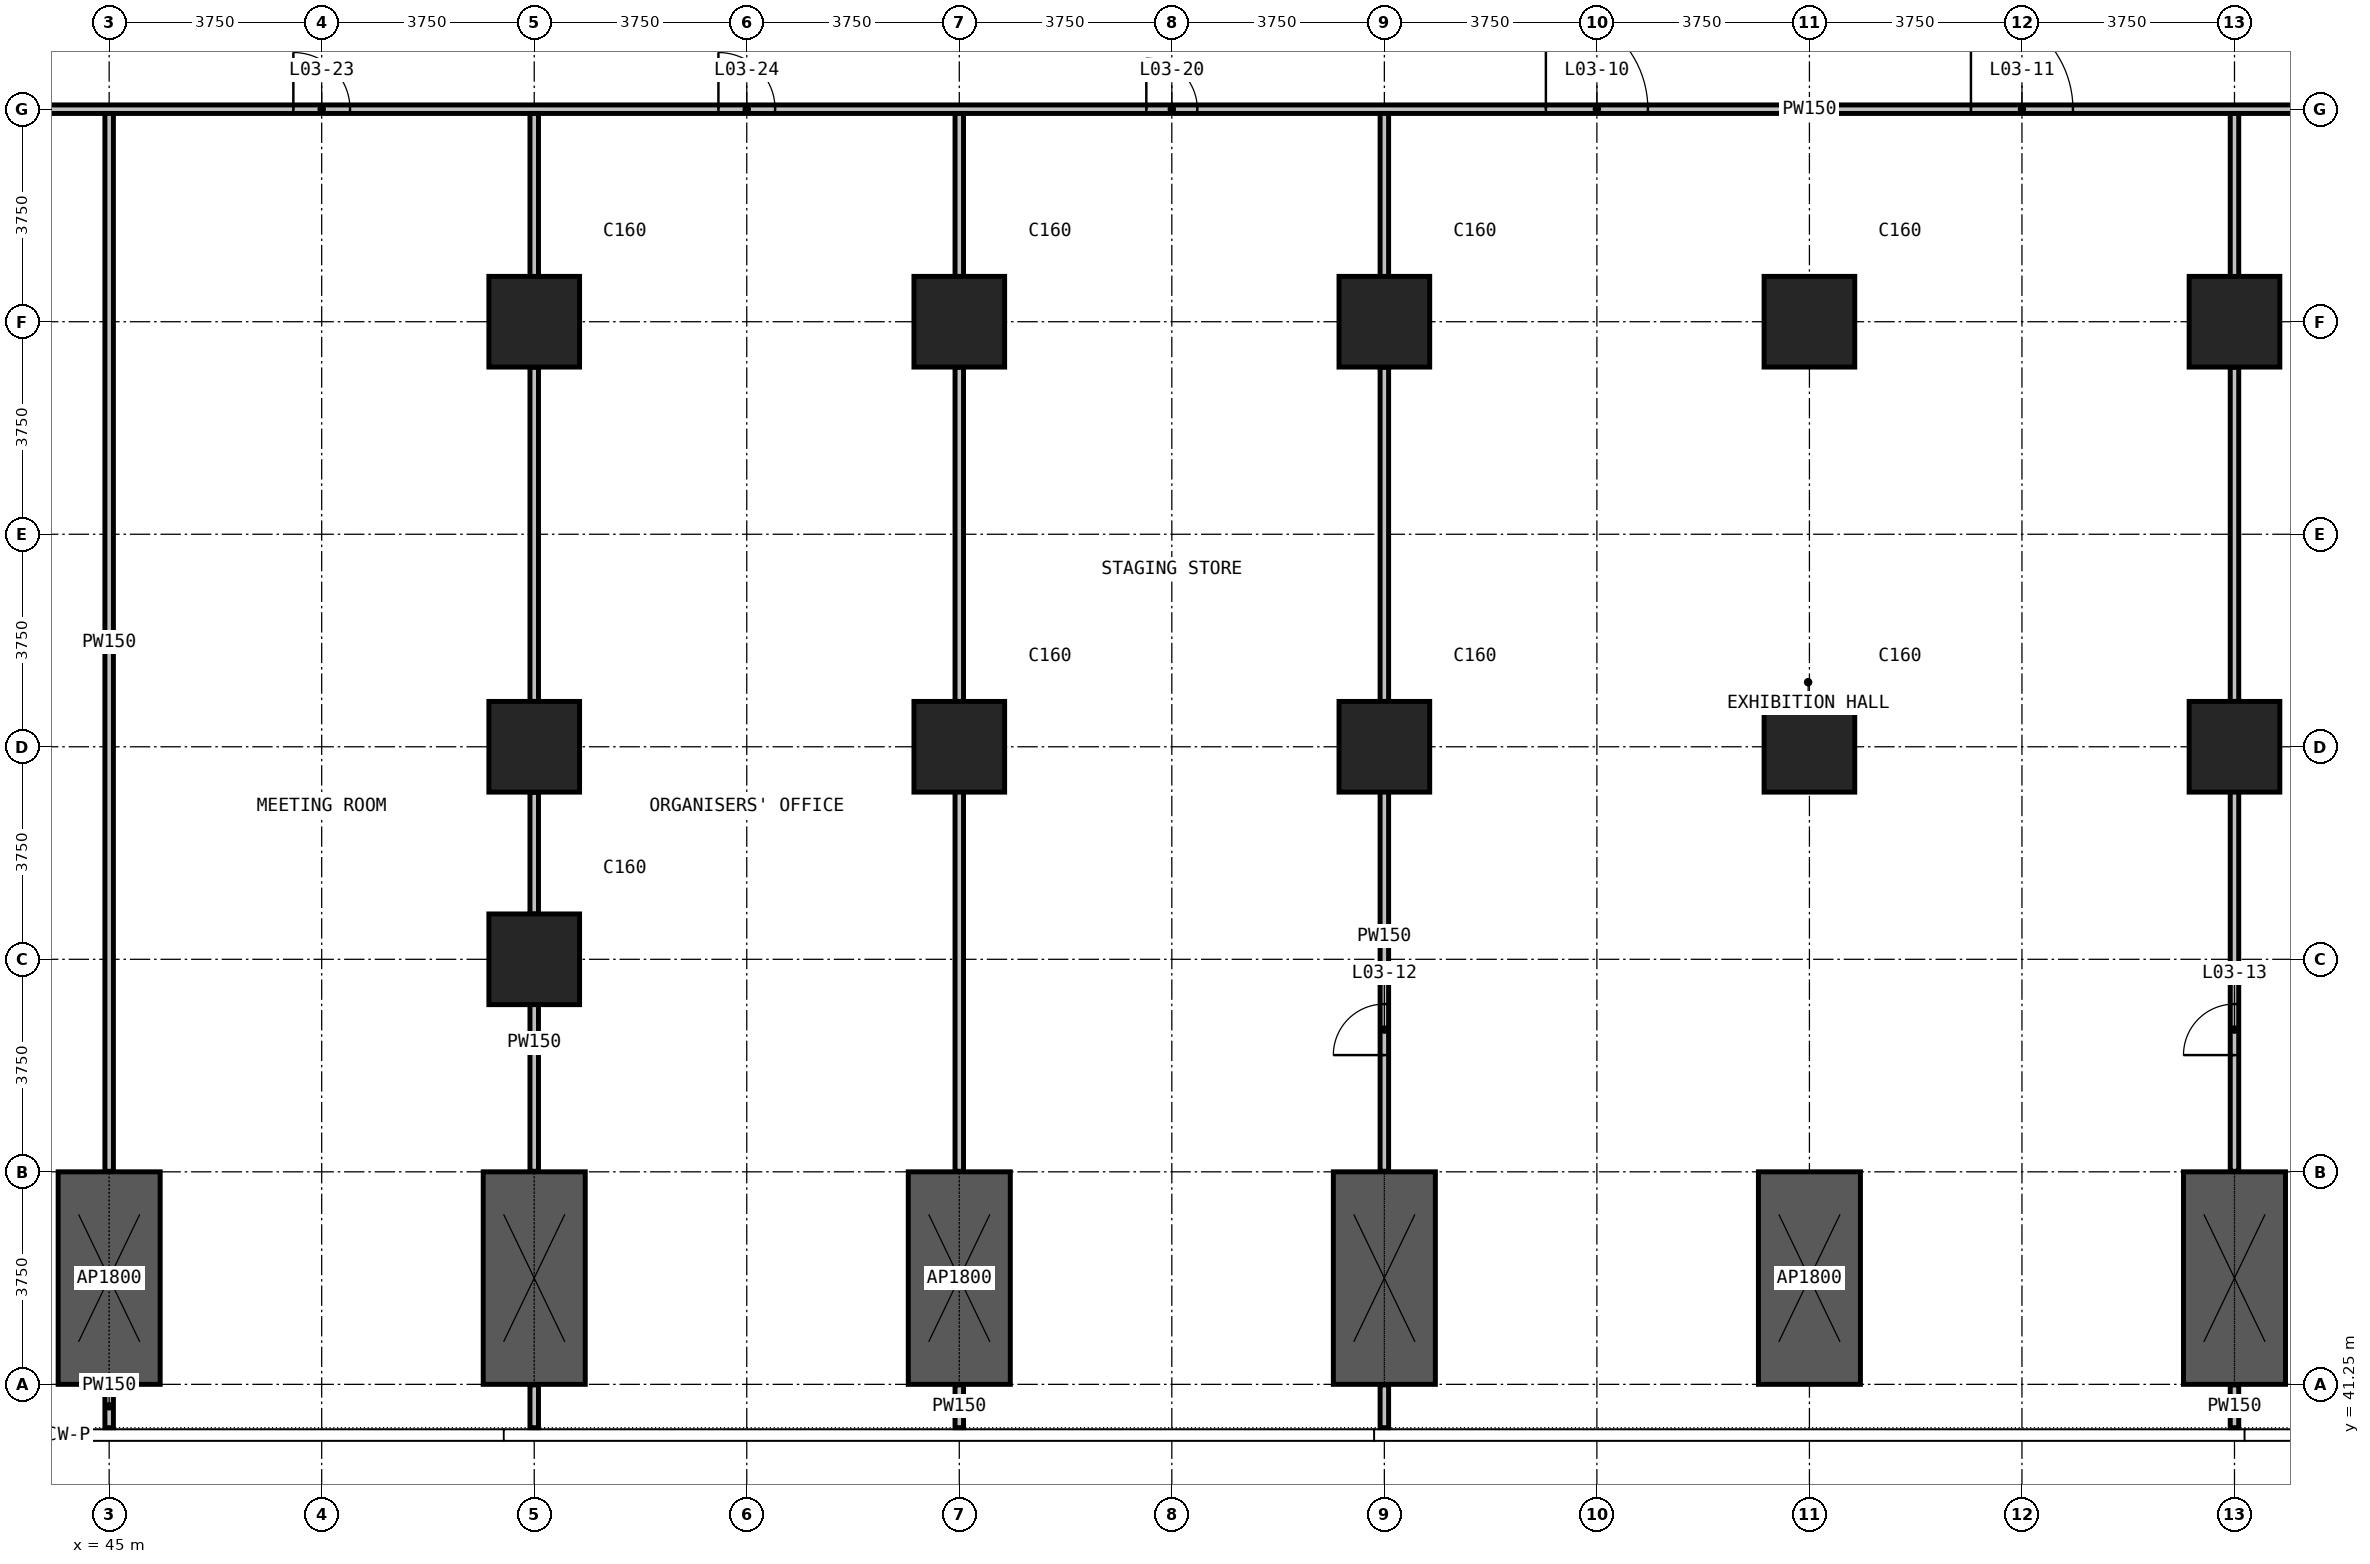
"""IFC4 building model, lengths in metres.
Left out: names, types, materials, properties, quantities, classifications, styles, units other than length and angle.
Written with IfcOpenShell. Run it as: python <this file> out.ifc"""

import sys

from ifc_helpers import new_model, si_unit, direction, frame, frame_2d, origin, origin_2d, place, context, subcontext, project, spatial, rectangle, extrude, element, fill, save


model = new_model("IFC4")
c1 = context("Model", 3, precision=1e-05, world=origin(), true_north=direction((0.0, 1.0)))
c2 = subcontext(c1, "Body", "Model", "MODEL_VIEW")
j1 = project(units=[si_unit("LENGTHUNIT", "METRE"), si_unit("PLANEANGLEUNIT", "RADIAN")], contexts=[c1])
p1 = place(None, origin())
s1 = spatial("IfcSite", under=j1, at=p1, CompositionType="ELEMENT")
p2 = place(p1, origin())
s2 = spatial("IfcBuilding", under=s1, at=p2, CompositionType="ELEMENT")
p3 = place(p2, frame((0.0, 0.0, 24.0)))
s3 = spatial("IfcBuildingStorey", under=s2, at=p3, CompositionType="ELEMENT", Elevation=24.0)
for number, where, z_axis, x_axis in (
    (1, (45.0, 41.25, 0.0), (0.0, 0.0, 1.0), (0.0, 1.0, 0.0)),
    (2, (52.5, 41.25, 0.0), (0.0, 0.0, 1.0), (0.0, 1.0, 0.0)),
    (3, (60.0, 41.25, 0.0), (0.0, 0.0, 1.0), (0.0, 1.0, 0.0)),
    (4, (67.5, 41.25, 0.0), (0.0, 0.0, 1.0), (0.0, 1.0, 0.0)),
    (5, (75.0, 41.25, 0.0), (0.0, 0.0, 1.0), (0.0, 1.0, 0.0)),
    (6, (82.5, 41.25, 0.0), (0.0, 0.0, 1.0), (0.0, 1.0, 0.0)),
):
    element("IfcWall", number, at=place(p3, frame(where, z_axis=z_axis, x_axis=x_axis)), inside=s3, PredefinedType="SHEAR", context=c2, shape_type="SweptSolid", body=[
        extrude(rectangle(XDim=3.75, YDim=1.8, at=frame_2d((1.875, 0.0))), origin(), (0.0, 0.0, 1.0), 6.0),
    ])
for number, where, z_axis, x_axis in (
    (7, (52.5, 48.75, 0.0), (0.0, 0.0, 1.0), (1.0, 0.0, 0.0)),
    (8, (52.5, 52.5, 0.0), (0.0, 0.0, 1.0), (1.0, 0.0, 0.0)),
    (9, (52.5, 60.0, 0.0), (0.0, 0.0, 1.0), (1.0, 0.0, 0.0)),
    (10, (60.0, 52.5, 0.0), (0.0, 0.0, 1.0), (1.0, 0.0, 0.0)),
    (11, (60.0, 60.0, 0.0), (0.0, 0.0, 1.0), (1.0, 0.0, 0.0)),
    (12, (67.5, 52.5, 0.0), (0.0, 0.0, 1.0), (1.0, 0.0, 0.0)),
    (13, (67.5, 60.0, 0.0), (0.0, 0.0, 1.0), (1.0, 0.0, 0.0)),
    (14, (75.0, 52.5, 0.0), (0.0, 0.0, 1.0), (1.0, 0.0, 0.0)),
    (15, (75.0, 60.0, 0.0), (0.0, 0.0, 1.0), (1.0, 0.0, 0.0)),
    (16, (82.5, 52.5, 0.0), (0.0, 0.0, 1.0), (1.0, 0.0, 0.0)),
    (17, (82.5, 60.0, 0.0), (0.0, 0.0, 1.0), (1.0, 0.0, 0.0)),
):
    element("IfcColumn", number, at=place(p3, frame(where, z_axis=z_axis, x_axis=x_axis)), inside=s3, PredefinedType="COLUMN", context=c2, shape_type="SweptSolid", body=[
        extrude(rectangle(XDim=1.6, YDim=1.6, at=origin_2d()), origin(), (0.0, 0.0, 1.0), 6.0),
    ])
p4 = place(p3, frame((36.735, 63.75, 0.0), z_axis=(0.0, 0.0, 1.0), x_axis=(1.0, 0.0, 0.0)))
e18 = element("IfcWall", 18, at=p4, inside=s3, PredefinedType="PARTITIONING", context=c2, shape_type="SweptSolid", body=[
    extrude(rectangle(XDim=76.53, YDim=0.15, at=frame_2d((38.265, 0.0))), origin(), (0.0, 0.0, 1.0), 5.65),
])
p5 = place(p4, frame((33.615, 0.0, 0.0)))
e19 = element("IfcOpeningElement", 19, at=p5, cuts=e18, PredefinedType="OPENING", context=c2, shape_type="SweptSolid", body=[
    extrude(rectangle(XDim=1.8, YDim=2.2, at=frame_2d((0.9, 1.1))), frame((0.0, 0.085, 0.0), z_axis=(0.0, -1.0, 0.0), x_axis=(1.0, 0.0, 0.0)), (0.0, 0.0, 1.0), 0.17),
])
p6 = place(p4, frame((41.115, 0.0, 0.0)))
e20 = element("IfcOpeningElement", 20, at=p6, cuts=e18, PredefinedType="OPENING", context=c2, shape_type="SweptSolid", body=[
    extrude(rectangle(XDim=1.8, YDim=2.2, at=frame_2d((0.9, 1.1))), frame((0.0, 0.085, 0.0), z_axis=(0.0, -1.0, 0.0), x_axis=(1.0, 0.0, 0.0)), (0.0, 0.0, 1.0), 0.17),
])
p7 = place(p4, frame((26.565, 0.0, 0.0)))
e21 = element("IfcOpeningElement", 21, at=p7, cuts=e18, PredefinedType="OPENING", context=c2, shape_type="SweptSolid", body=[
    extrude(rectangle(XDim=0.9, YDim=2.2, at=frame_2d((0.45, 1.1))), frame((0.0, 0.085, 0.0), z_axis=(0.0, -1.0, 0.0), x_axis=(1.0, 0.0, 0.0)), (0.0, 0.0, 1.0), 0.17),
])
p8 = place(p4, frame((49.065, 0.0, 0.0)))
e22 = element("IfcOpeningElement", 22, at=p8, cuts=e18, PredefinedType="OPENING", context=c2, shape_type="SweptSolid", body=[
    extrude(rectangle(XDim=0.9, YDim=2.2, at=frame_2d((0.45, 1.1))), frame((0.0, 0.085, 0.0), z_axis=(0.0, -1.0, 0.0), x_axis=(1.0, 0.0, 0.0)), (0.0, 0.0, 1.0), 0.17),
])
p9 = place(p4, frame((3.65, 0.0, 0.0)))
e23 = element("IfcOpeningElement", 23, at=p9, cuts=e18, PredefinedType="OPENING", context=c2, shape_type="SweptSolid", body=[
    extrude(rectangle(XDim=1.0, YDim=2.2, at=frame_2d((0.5, 1.1))), frame((0.0, 0.085, 0.0), z_axis=(0.0, -1.0, 0.0), x_axis=(1.0, 0.0, 0.0)), (0.0, 0.0, 1.0), 0.17),
])
p10 = place(p4, frame((11.515, 0.0, 0.0)))
e24 = element("IfcOpeningElement", 24, at=p10, cuts=e18, PredefinedType="OPENING", context=c2, shape_type="SweptSolid", body=[
    extrude(rectangle(XDim=1.0, YDim=2.2, at=frame_2d((0.5, 1.1))), frame((0.0, 0.085, 0.0), z_axis=(0.0, -1.0, 0.0), x_axis=(1.0, 0.0, 0.0)), (0.0, 0.0, 1.0), 0.17),
])
p11 = place(p4, frame((19.015, 0.0, 0.0)))
e25 = element("IfcOpeningElement", 25, at=p11, cuts=e18, PredefinedType="OPENING", context=c2, shape_type="SweptSolid", body=[
    extrude(rectangle(XDim=1.0, YDim=2.2, at=frame_2d((0.5, 1.1))), frame((0.0, 0.085, 0.0), z_axis=(0.0, -1.0, 0.0), x_axis=(1.0, 0.0, 0.0)), (0.0, 0.0, 1.0), 0.17),
])
p12 = place(p4, frame((56.515, 0.0, 0.0)))
e26 = element("IfcOpeningElement", 26, at=p12, cuts=e18, PredefinedType="OPENING", context=c2, shape_type="SweptSolid", body=[
    extrude(rectangle(XDim=1.0, YDim=2.2, at=frame_2d((0.5, 1.1))), frame((0.0, 0.085, 0.0), z_axis=(0.0, -1.0, 0.0), x_axis=(1.0, 0.0, 0.0)), (0.0, 0.0, 1.0), 0.17),
])
p13 = place(p4, frame((64.015, 0.0, 0.0)))
e27 = element("IfcOpeningElement", 27, at=p13, cuts=e18, PredefinedType="OPENING", context=c2, shape_type="SweptSolid", body=[
    extrude(rectangle(XDim=1.0, YDim=2.2, at=frame_2d((0.5, 1.1))), frame((0.0, 0.085, 0.0), z_axis=(0.0, -1.0, 0.0), x_axis=(1.0, 0.0, 0.0)), (0.0, 0.0, 1.0), 0.17),
])
p14 = place(p4, frame((71.915, 0.0, 0.0)))
e28 = element("IfcOpeningElement", 28, at=p14, cuts=e18, PredefinedType="OPENING", context=c2, shape_type="SweptSolid", body=[
    extrude(rectangle(XDim=1.0, YDim=2.2, at=frame_2d((0.5, 1.1))), frame((0.0, 0.085, 0.0), z_axis=(0.0, -1.0, 0.0), x_axis=(1.0, 0.0, 0.0)), (0.0, 0.0, 1.0), 0.17),
])
p15 = place(p3, frame((45.0, 40.485, 0.0), z_axis=(0.0, 0.0, 1.0), x_axis=(0.0, 1.0, 0.0)))
e29 = element("IfcWall", 29, at=p15, inside=s3, PredefinedType="PARTITIONING", context=c2, shape_type="SweptSolid", body=[
    extrude(rectangle(XDim=0.755, YDim=0.15, at=frame_2d((0.377, 0.0))), origin(), (0.0, 0.0, 1.0), 5.65),
])
p16 = place(p3, frame((45.0, 45.01, 0.0), z_axis=(0.0, 0.0, 1.0), x_axis=(0.0, 1.0, 0.0)))
e30 = element("IfcWall", 30, at=p16, inside=s3, PredefinedType="PARTITIONING", context=c2, shape_type="SweptSolid", body=[
    extrude(rectangle(XDim=18.665, YDim=0.15, at=frame_2d((9.333, 0.0))), origin(), (0.0, 0.0, 1.0), 5.65),
])
p17 = place(p3, frame((52.5, 40.485, 0.0), z_axis=(0.0, 0.0, 1.0), x_axis=(0.0, 1.0, 0.0)))
e31 = element("IfcWall", 31, at=p17, inside=s3, PredefinedType="PARTITIONING", context=c2, shape_type="SweptSolid", body=[
    extrude(rectangle(XDim=0.755, YDim=0.15, at=frame_2d((0.377, 0.0))), origin(), (0.0, 0.0, 1.0), 5.65),
])
p18 = place(p3, frame((52.5, 45.01, 0.0), z_axis=(0.0, 0.0, 1.0), x_axis=(0.0, 1.0, 0.0)))
e32 = element("IfcWall", 32, at=p18, inside=s3, PredefinedType="PARTITIONING", context=c2, shape_type="SweptSolid", body=[
    extrude(rectangle(XDim=4.539, YDim=0.15, at=frame_2d((2.27, 0.0))), origin(), (0.0, 0.0, 1.0), 5.65),
])
p19 = place(p3, frame((52.5, 49.549, 0.0), z_axis=(0.0, 0.0, 1.0), x_axis=(0.0, 1.0, 0.0)))
e33 = element("IfcWall", 33, at=p19, inside=s3, PredefinedType="PARTITIONING", context=c2, shape_type="SweptSolid", body=[
    extrude(rectangle(XDim=2.152, YDim=0.15, at=frame_2d((1.076, 0.0))), origin(), (0.0, 0.0, 1.0), 4.85),
])
p20 = place(p3, frame((52.5, 51.701, 0.0), z_axis=(0.0, 0.0, 1.0), x_axis=(0.0, 1.0, 0.0)))
e34 = element("IfcWall", 34, at=p20, inside=s3, PredefinedType="PARTITIONING", context=c2, shape_type="SweptSolid", body=[
    extrude(rectangle(XDim=1.599, YDim=0.15, at=frame_2d((0.8, 0.0))), origin(), (0.0, 0.0, 1.0), 5.65),
])
p21 = place(p3, frame((52.5, 53.3, 0.0), z_axis=(0.0, 0.0, 1.0), x_axis=(0.0, 1.0, 0.0)))
e35 = element("IfcWall", 35, at=p21, inside=s3, PredefinedType="PARTITIONING", context=c2, shape_type="SweptSolid", body=[
    extrude(rectangle(XDim=5.901, YDim=0.15, at=frame_2d((2.95, 0.0))), origin(), (0.0, 0.0, 1.0), 4.85),
])
p22 = place(p3, frame((52.5, 59.201, 0.0), z_axis=(0.0, 0.0, 1.0), x_axis=(0.0, 1.0, 0.0)))
e36 = element("IfcWall", 36, at=p22, inside=s3, PredefinedType="PARTITIONING", context=c2, shape_type="SweptSolid", body=[
    extrude(rectangle(XDim=4.474, YDim=0.15, at=frame_2d((2.237, 0.0))), origin(), (0.0, 0.0, 1.0), 5.65),
])
p23 = place(p3, frame((60.0, 40.485, 0.0), z_axis=(0.0, 0.0, 1.0), x_axis=(0.0, 1.0, 0.0)))
e37 = element("IfcWall", 37, at=p23, inside=s3, PredefinedType="PARTITIONING", context=c2, shape_type="SweptSolid", body=[
    extrude(rectangle(XDim=0.755, YDim=0.15, at=frame_2d((0.377, 0.0))), origin(), (0.0, 0.0, 1.0), 5.65),
])
p24 = place(p3, frame((60.0, 45.01, 0.0), z_axis=(0.0, 0.0, 1.0), x_axis=(0.0, 1.0, 0.0)))
e38 = element("IfcWall", 38, at=p24, inside=s3, PredefinedType="PARTITIONING", context=c2, shape_type="SweptSolid", body=[
    extrude(rectangle(XDim=8.29, YDim=0.15, at=frame_2d((4.145, 0.0))), origin(), (0.0, 0.0, 1.0), 5.65),
])
p25 = place(p3, frame((60.0, 53.3, 0.0), z_axis=(0.0, 0.0, 1.0), x_axis=(0.0, 1.0, 0.0)))
e39 = element("IfcWall", 39, at=p25, inside=s3, PredefinedType="PARTITIONING", context=c2, shape_type="SweptSolid", body=[
    extrude(rectangle(XDim=5.901, YDim=0.15, at=frame_2d((2.95, 0.0))), origin(), (0.0, 0.0, 1.0), 4.85),
])
p26 = place(p3, frame((60.0, 59.201, 0.0), z_axis=(0.0, 0.0, 1.0), x_axis=(0.0, 1.0, 0.0)))
e40 = element("IfcWall", 40, at=p26, inside=s3, PredefinedType="PARTITIONING", context=c2, shape_type="SweptSolid", body=[
    extrude(rectangle(XDim=4.474, YDim=0.15, at=frame_2d((2.237, 0.0))), origin(), (0.0, 0.0, 1.0), 5.65),
])
p27 = place(p3, frame((67.5, 40.485, 0.0), z_axis=(0.0, 0.0, 1.0), x_axis=(0.0, 1.0, 0.0)))
e41 = element("IfcWall", 41, at=p27, inside=s3, PredefinedType="PARTITIONING", context=c2, shape_type="SweptSolid", body=[
    extrude(rectangle(XDim=0.755, YDim=0.15, at=frame_2d((0.377, 0.0))), origin(), (0.0, 0.0, 1.0), 5.65),
])
p28 = place(p3, frame((67.5, 45.01, 0.0), z_axis=(0.0, 0.0, 1.0), x_axis=(0.0, 1.0, 0.0)))
e42 = element("IfcWall", 42, at=p28, inside=s3, PredefinedType="PARTITIONING", context=c2, shape_type="SweptSolid", body=[
    extrude(rectangle(XDim=8.29, YDim=0.15, at=frame_2d((4.145, 0.0))), origin(), (0.0, 0.0, 1.0), 5.65),
])
p29 = place(p28, frame((2.05, 0.0, 0.0)))
e43 = element("IfcOpeningElement", 43, at=p29, cuts=e42, PredefinedType="OPENING", context=c2, shape_type="SweptSolid", body=[
    extrude(rectangle(XDim=0.9, YDim=2.2, at=frame_2d((0.45, 1.1))), frame((0.0, 0.085, 0.0), z_axis=(0.0, -1.0, 0.0), x_axis=(1.0, 0.0, 0.0)), (0.0, 0.0, 1.0), 0.17),
])
p30 = place(p3, frame((67.5, 53.3, 0.0), z_axis=(0.0, 0.0, 1.0), x_axis=(0.0, 1.0, 0.0)))
e44 = element("IfcWall", 44, at=p30, inside=s3, PredefinedType="PARTITIONING", context=c2, shape_type="SweptSolid", body=[
    extrude(rectangle(XDim=5.901, YDim=0.15, at=frame_2d((2.95, 0.0))), origin(), (0.0, 0.0, 1.0), 4.85),
])
p31 = place(p3, frame((67.5, 59.201, 0.0), z_axis=(0.0, 0.0, 1.0), x_axis=(0.0, 1.0, 0.0)))
e45 = element("IfcWall", 45, at=p31, inside=s3, PredefinedType="PARTITIONING", context=c2, shape_type="SweptSolid", body=[
    extrude(rectangle(XDim=4.474, YDim=0.15, at=frame_2d((2.237, 0.0))), origin(), (0.0, 0.0, 1.0), 5.65),
])
p32 = place(p3, frame((82.5, 40.485, 0.0), z_axis=(0.0, 0.0, 1.0), x_axis=(0.0, 1.0, 0.0)))
e46 = element("IfcWall", 46, at=p32, inside=s3, PredefinedType="PARTITIONING", context=c2, shape_type="SweptSolid", body=[
    extrude(rectangle(XDim=0.755, YDim=0.15, at=frame_2d((0.377, 0.0))), origin(), (0.0, 0.0, 1.0), 5.65),
])
p33 = place(p3, frame((82.5, 45.01, 0.0), z_axis=(0.0, 0.0, 1.0), x_axis=(0.0, 1.0, 0.0)))
e47 = element("IfcWall", 47, at=p33, inside=s3, PredefinedType="PARTITIONING", context=c2, shape_type="SweptSolid", body=[
    extrude(rectangle(XDim=8.29, YDim=0.15, at=frame_2d((4.145, 0.0))), origin(), (0.0, 0.0, 1.0), 5.65),
])
p34 = place(p33, frame((2.05, 0.0, 0.0)))
e48 = element("IfcOpeningElement", 48, at=p34, cuts=e47, PredefinedType="OPENING", context=c2, shape_type="SweptSolid", body=[
    extrude(rectangle(XDim=0.9, YDim=2.2, at=frame_2d((0.45, 1.1))), frame((0.0, 0.085, 0.0), z_axis=(0.0, -1.0, 0.0), x_axis=(1.0, 0.0, 0.0)), (0.0, 0.0, 1.0), 0.17),
])
p35 = place(p3, frame((82.5, 53.3, 0.0), z_axis=(0.0, 0.0, 1.0), x_axis=(0.0, 1.0, 0.0)))
e49 = element("IfcWall", 49, at=p35, inside=s3, PredefinedType="PARTITIONING", context=c2, shape_type="SweptSolid", body=[
    extrude(rectangle(XDim=5.901, YDim=0.15, at=frame_2d((2.95, 0.0))), origin(), (0.0, 0.0, 1.0), 4.85),
])
p36 = place(p3, frame((82.5, 59.201, 0.0), z_axis=(0.0, 0.0, 1.0), x_axis=(0.0, 1.0, 0.0)))
e50 = element("IfcWall", 50, at=p36, inside=s3, PredefinedType="PARTITIONING", context=c2, shape_type="SweptSolid", body=[
    extrude(rectangle(XDim=4.474, YDim=0.15, at=frame_2d((2.237, 0.0))), origin(), (0.0, 0.0, 1.0), 5.65),
])
p37 = place(p5, origin())
e51 = element("IfcDoor", 51, at=p37, inside=s3, OperationType="DOUBLE_DOOR_SINGLE_SWING", PredefinedType="DOOR", context=c2, shape_type="SweptSolid", body=[
    extrude(rectangle(XDim=1.8, YDim=2.2, at=frame_2d((0.9, 1.1))), frame((0.0, 0.025, 0.0), z_axis=(0.0, -1.0, 0.0), x_axis=(1.0, 0.0, 0.0)), (0.0, 0.0, 1.0), 0.05),
])
fill(e19, e51)
p38 = place(p6, origin())
e52 = element("IfcDoor", 52, at=p38, inside=s3, OperationType="DOUBLE_DOOR_SINGLE_SWING", PredefinedType="DOOR", context=c2, shape_type="SweptSolid", body=[
    extrude(rectangle(XDim=1.8, YDim=2.2, at=frame_2d((0.9, 1.1))), frame((0.0, 0.025, 0.0), z_axis=(0.0, -1.0, 0.0), x_axis=(1.0, 0.0, 0.0)), (0.0, 0.0, 1.0), 0.05),
])
fill(e20, e52)
p39 = place(p29, origin())
e53 = element("IfcDoor", 53, at=p39, inside=s3, OperationType="SINGLE_SWING_RIGHT", PredefinedType="DOOR", context=c2, shape_type="SweptSolid", body=[
    extrude(rectangle(XDim=0.9, YDim=2.2, at=frame_2d((0.45, 1.1))), frame((0.0, 0.025, 0.0), z_axis=(0.0, -1.0, 0.0), x_axis=(1.0, 0.0, 0.0)), (0.0, 0.0, 1.0), 0.05),
])
fill(e43, e53)
p40 = place(p34, origin())
e54 = element("IfcDoor", 54, at=p40, inside=s3, OperationType="SINGLE_SWING_LEFT", PredefinedType="DOOR", context=c2, shape_type="SweptSolid", body=[
    extrude(rectangle(XDim=0.9, YDim=2.2, at=frame_2d((0.45, 1.1))), frame((0.0, 0.025, 0.0), z_axis=(0.0, -1.0, 0.0), x_axis=(1.0, 0.0, 0.0)), (0.0, 0.0, 1.0), 0.05),
])
fill(e48, e54)
p41 = place(p7, origin())
e55 = element("IfcDoor", 55, at=p41, inside=s3, OperationType="SINGLE_SWING_LEFT", PredefinedType="DOOR", context=c2, shape_type="SweptSolid", body=[
    extrude(rectangle(XDim=0.9, YDim=2.2, at=frame_2d((0.45, 1.1))), frame((0.0, 0.025, 0.0), z_axis=(0.0, -1.0, 0.0), x_axis=(1.0, 0.0, 0.0)), (0.0, 0.0, 1.0), 0.05),
])
fill(e21, e55)
p42 = place(p10, origin())
e56 = element("IfcDoor", 56, at=p42, inside=s3, OperationType="SINGLE_SWING_RIGHT", PredefinedType="DOOR", context=c2, shape_type="SweptSolid", body=[
    extrude(rectangle(XDim=1.0, YDim=2.2, at=frame_2d((0.5, 1.1))), frame((0.0, 0.025, 0.0), z_axis=(0.0, -1.0, 0.0), x_axis=(1.0, 0.0, 0.0)), (0.0, 0.0, 1.0), 0.05),
])
fill(e24, e56)
p43 = place(p11, origin())
e57 = element("IfcDoor", 57, at=p43, inside=s3, OperationType="SINGLE_SWING_LEFT", PredefinedType="DOOR", context=c2, shape_type="SweptSolid", body=[
    extrude(rectangle(XDim=1.0, YDim=2.2, at=frame_2d((0.5, 1.1))), frame((0.0, 0.025, 0.0), z_axis=(0.0, -1.0, 0.0), x_axis=(1.0, 0.0, 0.0)), (0.0, 0.0, 1.0), 0.05),
])
fill(e25, e57)
save(model, sys.argv[1])
